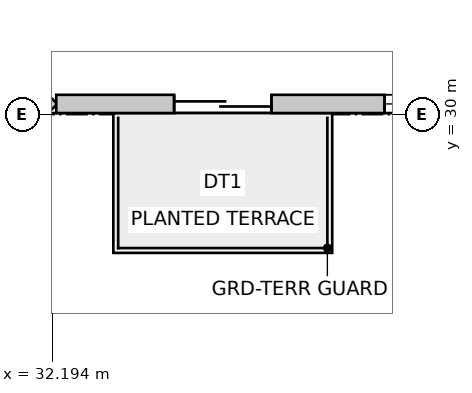
"""IFC4 building model, lengths in metres.
Left out: names, types, materials, properties, quantities, classifications, styles, units other than length and angle.
Written with IfcOpenShell. Run it as: python <this file> out.ifc"""

import sys

from ifc_helpers import new_model, si_unit, direction, frame, frame_2d, origin, place, context, subcontext, project, spatial, rectangle, extrude, source, transform, mapped, element, fill, save


model = new_model("IFC4")
c1 = context("Model", 3, precision=1e-05, world=origin(), true_north=direction((0.0, 1.0)))
c2 = subcontext(c1, "Body", "Model", "MODEL_VIEW")
j1 = project(units=[si_unit("LENGTHUNIT", "METRE"), si_unit("PLANEANGLEUNIT", "RADIAN")], contexts=[c1])
p1 = place(None, origin())
s1 = spatial("IfcSite", under=j1, at=p1, CompositionType="ELEMENT")
p2 = place(p1, origin())
s2 = spatial("IfcBuilding", under=s1, at=p2, CompositionType="ELEMENT")
p3 = place(p2, frame((0.0, 0.0, 95.0)))
s3 = spatial("IfcBuildingStorey", under=s2, at=p3, CompositionType="ELEMENT", Elevation=95.0)
p4 = place(p3, frame((30.116, 28.228, 0.0), z_axis=(0.0, 0.0, 1.0), x_axis=(0.707064797706, 0.707148762175, 0.0)))
e1 = element("IfcWall", 1, at=p4, inside=s3, PredefinedType="SOLIDWALL", context=c2, shape_type="SweptSolid", body=[
    extrude(rectangle(XDim=2.908, YDim=0.3, at=frame_2d((1.454, 0.0))), origin(), (0.0, 0.0, 1.0), 3.7),
])
m1 = source(origin(), c2, "Body", "SweptSolid", [
    extrude(rectangle(XDim=2.1, YDim=2.0, at=frame_2d((1.05, 1.0))), frame((0.0, 0.16, 0.0), z_axis=(0.0, -1.0, 0.0), x_axis=(1.0, 0.0, 0.0)), (0.0, 0.0, 1.0), 0.32),
])
p5 = place(p4, frame((0.404, 0.0, 0.85)))
e2 = element("IfcOpeningElement", 2, at=p5, cuts=e1, PredefinedType="OPENING", context=c2, shape_type="MappedRepresentation", body=[
    mapped(m1, transform((0.0, 0.0, 0.0), scale=1.0)),
])
p6 = place(p3, frame((32.261, 30.178, 0.0), z_axis=(0.0, 0.0, 1.0), x_axis=(1.0, 0.0, 0.0)))
e3 = element("IfcWall", 3, at=p6, inside=s3, PredefinedType="SOLIDWALL", context=c2, shape_type="SweptSolid", body=[
    extrude(rectangle(XDim=20.827, YDim=0.3, at=frame_2d((10.414, 0.0))), origin(), (0.0, 0.0, 1.0), 3.7),
])
m2 = source(origin(), c2, "Body", "SweptSolid", [
    extrude(rectangle(XDim=1.6, YDim=2.15, at=frame_2d((0.8, 1.075))), frame((0.0, 0.16, 0.0), z_axis=(0.0, -1.0, 0.0), x_axis=(1.0, 0.0, 0.0)), (0.0, 0.0, 1.0), 0.32),
])
p7 = place(p6, frame((1.939, 0.0, 0.0)))
e4 = element("IfcOpeningElement", 4, at=p7, cuts=e3, PredefinedType="OPENING", context=c2, shape_type="MappedRepresentation", body=[
    mapped(m2, transform((0.0, 0.0, 0.0), scale=1.0)),
])
m3 = source(origin(), c2, "Body", "SweptSolid", [
    extrude(rectangle(XDim=2.4, YDim=2.2, at=frame_2d((1.2, 1.1))), frame((0.0, 0.16, 0.0), z_axis=(0.0, -1.0, 0.0), x_axis=(1.0, 0.0, 0.0)), (0.0, 0.0, 1.0), 0.32),
])
p8 = place(p6, frame((5.4, 0.0, 0.85)))
e5 = element("IfcOpeningElement", 5, at=p8, cuts=e3, PredefinedType="OPENING", context=c2, shape_type="MappedRepresentation", body=[
    mapped(m3, transform((0.0, 0.0, 0.0), scale=1.0)),
])
m4 = source(origin(), c2, "Body", "SweptSolid", [
    extrude(rectangle(XDim=2.8, YDim=2.4, at=frame_2d((1.4, 1.2))), frame((0.0, 0.16, 0.0), z_axis=(0.0, -1.0, 0.0), x_axis=(1.0, 0.0, 0.0)), (0.0, 0.0, 1.0), 0.32),
])
p9 = place(p6, frame((10.763, 0.0, 0.85)))
e6 = element("IfcOpeningElement", 6, at=p9, cuts=e3, PredefinedType="OPENING", context=c2, shape_type="MappedRepresentation", body=[
    mapped(m4, transform((0.0, 0.0, 0.0), scale=1.0)),
])
p10 = place(p6, frame((16.526, 0.0, 0.85)))
e7 = element("IfcOpeningElement", 7, at=p10, cuts=e3, PredefinedType="OPENING", context=c2, shape_type="MappedRepresentation", body=[
    mapped(m3, transform((0.0, 0.0, 0.0), scale=1.0)),
])
m5 = source(origin(), c2, "Body", "SweptSolid", [
    extrude(rectangle(XDim=1.6, YDim=2.15, at=frame_2d((0.8, 1.075))), frame((0.0, 0.025, 0.0), z_axis=(0.0, -1.0, 0.0), x_axis=(1.0, 0.0, 0.0)), (0.0, 0.0, 1.0), 0.05),
])
p11 = place(p7, origin())
e8 = element("IfcDoor", 8, at=p11, inside=s3, OperationType="DOUBLE_DOOR_SLIDING", PredefinedType="DOOR", context=c2, shape_type="MappedRepresentation", body=[
    mapped(m5, transform((0.0, 0.0, 0.0), scale=1.0)),
])
fill(e4, e8)
m6 = source(origin(), c2, "Body", "SweptSolid", [
    extrude(rectangle(XDim=2.4, YDim=2.2, at=frame_2d((1.2, 1.1))), frame((0.0, -0.015, 0.0), z_axis=(0.0, -1.0, 0.0), x_axis=(1.0, 0.0, 0.0)), (0.0, 0.0, 1.0), 0.06),
])
p12 = place(p8, origin())
e9 = element("IfcWindow", 9, at=p12, inside=s3, PartitioningType="SINGLE_PANEL", PredefinedType="WINDOW", context=c2, shape_type="MappedRepresentation", body=[
    mapped(m6, transform((0.0, 0.0, 0.0), scale=1.0)),
])
fill(e5, e9)
save(model, sys.argv[1])
